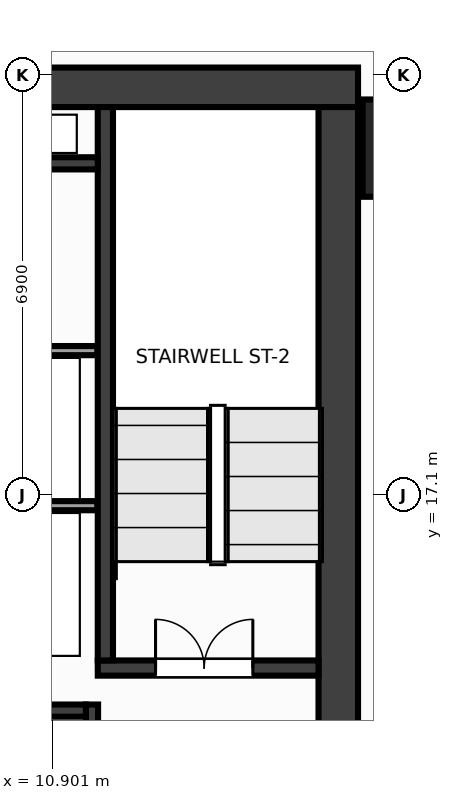
"""IFC4 building model, lengths in metres.
Left out: names, types, materials, properties, quantities, classifications, styles, units other than length and angle.
Written with IfcOpenShell. Run it as: python <this file> out.ifc"""

import sys

from ifc_helpers import new_model, si_unit, direction, frame, frame_2d, origin, origin_2d, place, context, subcontext, project, spatial, rectangle, extrude, source, transform, mapped, element, fill, save


model = new_model("IFC4")
c1 = context("Model", 3, precision=1e-05, world=origin(), true_north=direction((0.0, 1.0)))
c2 = subcontext(c1, "Body", "Model", "MODEL_VIEW")
j1 = project(units=[si_unit("LENGTHUNIT", "METRE"), si_unit("PLANEANGLEUNIT", "RADIAN")], contexts=[c1])
p1 = place(None, origin())
s1 = spatial("IfcSite", under=j1, at=p1, CompositionType="ELEMENT")
p2 = place(p1, origin())
s2 = spatial("IfcBuilding", under=s1, at=p2, CompositionType="ELEMENT")
p3 = place(p2, frame((0.0, 0.0, 174.8)))
s3 = spatial("IfcBuildingStorey", under=s2, at=p3, CompositionType="ELEMENT", Elevation=174.8)
m1 = source(origin(), c2, "Body", "SweptSolid", [
    extrude(rectangle(XDim=31.85, YDim=0.65, at=frame_2d((15.925, 0.0))), origin(), (0.0, 0.0, 1.0), 3.6),
])
p4 = place(p3, frame((-15.925, 23.8, 0.0), z_axis=(0.0, 0.0, 1.0), x_axis=(1.0, 0.0, 0.0)))
e1 = element("IfcWall", 1, at=p4, inside=s3, PredefinedType="SHEAR", context=c2, shape_type="MappedRepresentation", body=[
    mapped(m1, transform((0.0, 0.0, 0.0), x_axis=(1.0, 0.0, 0.0), y_axis=(0.0, 1.0, 0.0), z_axis=(0.0, 0.0, 1.0), scale=1.0)),
])
m2 = source(origin(), c2, "Body", "SweptSolid", [
    extrude(rectangle(XDim=12.95, YDim=0.65, at=frame_2d((6.475, 0.0))), origin(), (0.0, 0.0, 1.0), 3.6),
])
p5 = place(p3, frame((15.6, 10.525, 0.0), z_axis=(0.0, 0.0, 1.0), x_axis=(0.0, 1.0, 0.0)))
e2 = element("IfcWall", 2, at=p5, inside=s3, PredefinedType="SHEAR", context=c2, shape_type="MappedRepresentation", body=[
    mapped(m2, transform((0.0, 0.0, 0.0), x_axis=(1.0, 0.0, 0.0), y_axis=(0.0, 1.0, 0.0), z_axis=(0.0, 0.0, 1.0), scale=1.0)),
])
m3 = source(origin(), c2, "Body", "SweptSolid", [
    extrude(rectangle(XDim=3.63, YDim=0.25, at=frame_2d((1.815, 0.0))), origin(), (0.0, 0.0, 1.0), 3.6),
])
p6 = place(p3, frame((11.645, 14.25, 0.0), z_axis=(0.0, 0.0, 1.0), x_axis=(1.0, 0.0, 0.0)))
e3 = element("IfcWall", 3, at=p6, inside=s3, PredefinedType="SHEAR", context=c2, shape_type="MappedRepresentation", body=[
    mapped(m3, transform((0.0, 0.0, 0.0), x_axis=(1.0, 0.0, 0.0), y_axis=(0.0, 1.0, 0.0), z_axis=(0.0, 0.0, 1.0), scale=1.0)),
])
p7 = place(p6, frame((0.95, 0.0, 0.0)))
e4 = element("IfcOpeningElement", 4, at=p7, cuts=e3, PredefinedType="OPENING", context=c2, shape_type="SweptSolid", body=[
    extrude(rectangle(XDim=1.6, YDim=2.15, at=frame_2d((0.8, 1.075))), frame((0.0, 0.137, 0.0), z_axis=(0.0, -1.0, 0.0), x_axis=(1.0, 0.0, 0.0)), (0.0, 0.0, 1.0), 0.274),
])
m4 = source(origin(), c2, "Body", "SweptSolid", [
    extrude(rectangle(XDim=9.1, YDim=0.25, at=frame_2d((4.55, 0.0))), origin(), (0.0, 0.0, 1.0), 3.6),
])
p8 = place(p3, frame((11.77, 14.375, 0.0), z_axis=(0.0, 0.0, 1.0), x_axis=(0.0, 1.0, 0.0)))
e5 = element("IfcWall", 5, at=p8, inside=s3, PredefinedType="SHEAR", context=c2, shape_type="MappedRepresentation", body=[
    mapped(m4, transform((0.0, 0.0, 0.0), x_axis=(1.0, 0.0, 0.0), y_axis=(0.0, 1.0, 0.0), z_axis=(0.0, 0.0, 1.0), scale=1.0)),
])
m5 = source(origin(), c2, "Body", "SweptSolid", [
    extrude(rectangle(XDim=3.125, YDim=0.2, at=frame_2d((1.562, 0.0))), origin(), (0.0, 0.0, 1.0), 3.6),
])
p9 = place(p3, frame((11.55, 10.525, 0.0), z_axis=(0.0, 0.0, 1.0), x_axis=(0.0, 1.0, 0.0)))
e6 = element("IfcWall", 6, at=p9, inside=s3, PredefinedType="SHEAR", context=c2, shape_type="MappedRepresentation", body=[
    mapped(m5, transform((0.0, 0.0, 0.0), x_axis=(1.0, 0.0, 0.0), y_axis=(0.0, 1.0, 0.0), z_axis=(0.0, 0.0, 1.0), scale=1.0)),
])
p10 = place(p9, frame((0.9, 0.0, 0.0)))
e7 = element("IfcOpeningElement", 7, at=p10, cuts=e6, PredefinedType="OPENING", context=c2, shape_type="SweptSolid", body=[
    extrude(rectangle(XDim=1.1, YDim=2.15, at=frame_2d((0.55, 1.075))), frame((0.0, 0.112, 0.0), z_axis=(0.0, -1.0, 0.0), x_axis=(1.0, 0.0, 0.0)), (0.0, 0.0, 1.0), 0.224),
])
m6 = source(origin(), c2, "Body", "SweptSolid", [
    extrude(rectangle(XDim=2.825, YDim=0.2, at=frame_2d((1.413, 0.0))), origin(), (0.0, 0.0, 1.0), 3.6),
])
p11 = place(p3, frame((8.625, 13.55, 0.0), z_axis=(0.0, 0.0, 1.0), x_axis=(1.0, 0.0, 0.0)))
e8 = element("IfcWall", 8, at=p11, inside=s3, PredefinedType="SHEAR", context=c2, shape_type="MappedRepresentation", body=[
    mapped(m6, transform((0.0, 0.0, 0.0), x_axis=(1.0, 0.0, 0.0), y_axis=(0.0, 1.0, 0.0), z_axis=(0.0, 0.0, 1.0), scale=1.0)),
])
m7 = source(origin(), c2, "Body", "SweptSolid", [
    extrude(rectangle(XDim=3.02, YDim=0.2, at=frame_2d((1.51, 0.0))), origin(), (0.0, 0.0, 1.0), 3.6),
])
p12 = place(p3, frame((8.625, 22.55, 0.0), z_axis=(0.0, 0.0, 1.0), x_axis=(1.0, 0.0, 0.0)))
e9 = element("IfcWall", 9, at=p12, inside=s3, PredefinedType="SHEAR", context=c2, shape_type="MappedRepresentation", body=[
    mapped(m7, transform((0.0, 0.0, 0.0), x_axis=(1.0, 0.0, 0.0), y_axis=(0.0, 1.0, 0.0), z_axis=(0.0, 0.0, 1.0), scale=1.0)),
])
m8 = source(origin(), c2, "Body", "SweptSolid", [
    extrude(rectangle(XDim=1.6, YDim=1.6, at=origin_2d()), origin(), (0.0, 0.0, 1.0), 3.6),
])
p13 = place(p3, frame((16.8, 22.8, 0.0), z_axis=(0.0, 0.0, 1.0), x_axis=(1.0, 0.0, 0.0)))
e10 = element("IfcColumn", 10, at=p13, inside=s3, PredefinedType="COLUMN", context=c2, shape_type="MappedRepresentation", body=[
    mapped(m8, transform((0.0, 0.0, 0.0), x_axis=(1.0, 0.0, 0.0), y_axis=(0.0, 1.0, 0.0), z_axis=(0.0, 0.0, 1.0), scale=1.0)),
])
m9 = source(origin(), c2, "Body", "SweptSolid", [
    extrude(rectangle(XDim=3.01, YDim=0.15, at=frame_2d((1.505, 0.0))), origin(), (0.0, 0.0, 1.0), 3.38),
])
for number, where, z_axis, x_axis in (
    (11, (8.63, 16.92, 0.0), (0.0, 0.0, 1.0), (1.0, 0.0, 0.0)),
    (12, (8.63, 19.47, 0.0), (0.0, 0.0, 1.0), (1.0, 0.0, 0.0)),
):
    element("IfcWall", number, at=place(p3, frame(where, z_axis=z_axis, x_axis=x_axis)), inside=s3, PredefinedType="PARTITIONING", context=c2, shape_type="MappedRepresentation", body=[
        mapped(m9, transform((0.0, 0.0, 0.0), x_axis=(1.0, 0.0, 0.0), y_axis=(0.0, 1.0, 0.0), z_axis=(0.0, 0.0, 1.0), scale=1.0)),
    ])
m10 = source(origin(), c2, "Body", "SweptSolid", [
    extrude(rectangle(XDim=1.6, YDim=2.15, at=frame_2d((0.8, 1.075))), frame((0.0, 0.025, 0.0), z_axis=(0.0, -1.0, 0.0), x_axis=(1.0, 0.0, 0.0)), (0.0, 0.0, 1.0), 0.05),
])
p14 = place(p7, origin())
e13 = element("IfcDoor", 13, at=p14, inside=s3, OperationType="DOUBLE_DOOR_SINGLE_SWING", PredefinedType="DOOR", context=c2, shape_type="MappedRepresentation", body=[
    mapped(m10, transform((0.0, 0.0, 0.0), x_axis=(1.0, 0.0, 0.0), y_axis=(0.0, 1.0, 0.0), z_axis=(0.0, 0.0, 1.0), scale=1.0)),
])
fill(e4, e13)
save(model, sys.argv[1])
